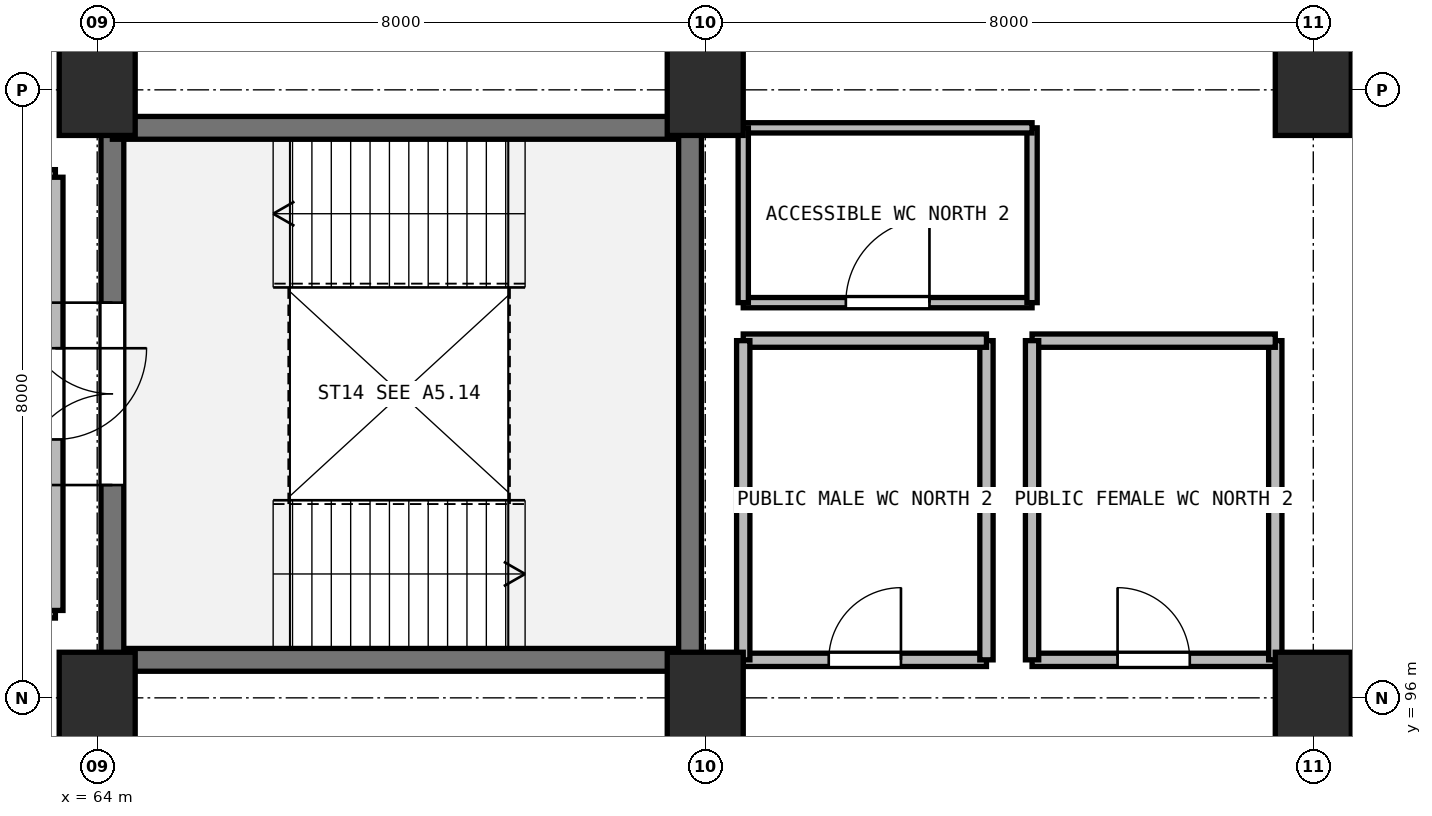
"""IFC4 building model, lengths in metres.
Left out: names, types, materials, properties, quantities, classifications, styles, units other than length and angle.
Written with IfcOpenShell. Run it as: python <this file> out.ifc"""

import sys

from ifc_helpers import new_model, si_unit, direction, frame, frame_2d, origin, origin_2d, place, context, subcontext, project, spatial, rectangle, extrude, element, fill, save


model = new_model("IFC4")
c1 = context("Model", 3, precision=1e-05, world=origin(), true_north=direction((0.0, 1.0)))
c2 = subcontext(c1, "Body", "Model", "MODEL_VIEW")
j1 = project(units=[si_unit("LENGTHUNIT", "METRE"), si_unit("PLANEANGLEUNIT", "RADIAN")], contexts=[c1])
p1 = place(None, origin())
s1 = spatial("IfcSite", under=j1, at=p1, CompositionType="ELEMENT")
p2 = place(p1, origin())
s2 = spatial("IfcBuilding", under=s1, at=p2, CompositionType="ELEMENT")
p3 = place(p2, frame((0.0, 0.0, 10.2)))
s3 = spatial("IfcBuildingStorey", under=s2, at=p3, CompositionType="ELEMENT", Elevation=10.2)
for number, where, z_axis, x_axis in (
    (1, (64.0, 96.0, 0.0), (0.0, 0.0, 1.0), (1.0, 0.0, 0.0)),
    (2, (64.0, 104.0, 0.0), (0.0, 0.0, 1.0), (1.0, 0.0, 0.0)),
    (3, (72.0, 96.0, 0.0), (0.0, 0.0, 1.0), (1.0, 0.0, 0.0)),
    (4, (72.0, 104.0, 0.0), (0.0, 0.0, 1.0), (1.0, 0.0, 0.0)),
    (5, (80.0, 96.0, 0.0), (0.0, 0.0, 1.0), (1.0, 0.0, 0.0)),
    (6, (80.0, 104.0, 0.0), (0.0, 0.0, 1.0), (1.0, 0.0, 0.0)),
):
    element("IfcColumn", number, at=place(p3, frame(where, z_axis=z_axis, x_axis=x_axis)), inside=s3, PredefinedType="COLUMN", context=c2, shape_type="SweptSolid", body=[
        extrude(rectangle(XDim=1.0, YDim=1.2, at=origin_2d()), origin(), (0.0, 0.0, 1.0), 4.8),
    ])
p4 = place(p3, frame((71.8, 96.5, 0.0), z_axis=(0.0, 0.0, 1.0), x_axis=(-1.0, 0.0, 0.0)))
e7 = element("IfcWall", 7, at=p4, inside=s3, PredefinedType="SHEAR", context=c2, shape_type="SweptSolid", body=[
    extrude(rectangle(XDim=7.6, YDim=0.3, at=frame_2d((3.8, 0.0))), origin(), (0.0, 0.0, 1.0), 4.46),
])
p5 = place(p3, frame((64.2, 96.5, 0.0), z_axis=(0.0, 0.0, 1.0), x_axis=(0.0, 1.0, 0.0)))
e8 = element("IfcWall", 8, at=p5, inside=s3, PredefinedType="SHEAR", context=c2, shape_type="SweptSolid", body=[
    extrude(rectangle(XDim=7.0, YDim=0.3, at=frame_2d((3.5, 0.0))), origin(), (0.0, 0.0, 1.0), 4.46),
])
p6 = place(p5, frame((2.3, 0.0, 0.0)))
e9 = element("IfcOpeningElement", 9, at=p6, cuts=e8, PredefinedType="OPENING", context=c2, shape_type="SweptSolid", body=[
    extrude(rectangle(XDim=2.4, YDim=2.2, at=frame_2d((1.2, 1.1))), frame((0.0, 0.16, 0.0), z_axis=(0.0, -1.0, 0.0), x_axis=(1.0, 0.0, 0.0)), (0.0, 0.0, 1.0), 0.32),
])
p7 = place(p3, frame((64.2, 103.5, 0.0), z_axis=(0.0, 0.0, 1.0), x_axis=(1.0, 0.0, 0.0)))
e10 = element("IfcWall", 10, at=p7, inside=s3, PredefinedType="SHEAR", context=c2, shape_type="SweptSolid", body=[
    extrude(rectangle(XDim=7.6, YDim=0.3, at=frame_2d((3.8, 0.0))), origin(), (0.0, 0.0, 1.0), 4.46),
])
p8 = place(p3, frame((71.8, 103.5, 0.0), z_axis=(0.0, 0.0, 1.0), x_axis=(0.0, -1.0, 0.0)))
e11 = element("IfcWall", 11, at=p8, inside=s3, PredefinedType="SHEAR", context=c2, shape_type="SweptSolid", body=[
    extrude(rectangle(XDim=7.0, YDim=0.3, at=frame_2d((3.5, 0.0))), origin(), (0.0, 0.0, 1.0), 4.46),
])
for number, where, z_axis, x_axis in (
    (12, (59.35, 102.85, 0.0), (0.0, 0.0, 1.0), (1.0, 0.0, 0.0)),
    (13, (63.45, 97.15, 0.0), (0.0, 0.0, 1.0), (-1.0, 0.0, 0.0)),
):
    element("IfcWall", number, at=place(p3, frame(where, z_axis=z_axis, x_axis=x_axis)), inside=s3, PredefinedType="PARTITIONING", context=c2, shape_type="SweptSolid", body=[
        extrude(rectangle(XDim=4.1, YDim=0.2, at=frame_2d((2.05, 0.0))), origin(), (0.0, 0.0, 1.0), 4.46),
    ])
p9 = place(p3, frame((63.45, 102.85, 0.0), z_axis=(0.0, 0.0, 1.0), x_axis=(0.0, -1.0, 0.0)))
e14 = element("IfcWall", 14, at=p9, inside=s3, PredefinedType="PARTITIONING", context=c2, shape_type="SweptSolid", body=[
    extrude(rectangle(XDim=5.7, YDim=0.2, at=frame_2d((2.85, 0.0))), origin(), (0.0, 0.0, 1.0), 3.6),
])
p10 = place(p9, frame((2.25, 0.0, 0.0)))
e15 = element("IfcOpeningElement", 15, at=p10, cuts=e14, PredefinedType="OPENING", context=c2, shape_type="SweptSolid", body=[
    extrude(rectangle(XDim=1.2, YDim=2.2, at=frame_2d((0.6, 1.1))), frame((0.0, 0.11, 0.0), z_axis=(0.0, -1.0, 0.0), x_axis=(1.0, 0.0, 0.0)), (0.0, 0.0, 1.0), 0.22),
])
p11 = place(p3, frame((72.5, 96.5, 0.0), z_axis=(0.0, 0.0, 1.0), x_axis=(1.0, 0.0, 0.0)))
e16 = element("IfcWall", 16, at=p11, inside=s3, PredefinedType="PARTITIONING", context=c2, shape_type="SweptSolid", body=[
    extrude(rectangle(XDim=3.2, YDim=0.175, at=frame_2d((1.6, 0.0))), origin(), (0.0, 0.0, 1.0), 3.6),
])
p12 = place(p11, frame((1.125, 0.0, 0.0)))
e17 = element("IfcOpeningElement", 17, at=p12, cuts=e16, PredefinedType="OPENING", context=c2, shape_type="SweptSolid", body=[
    extrude(rectangle(XDim=0.95, YDim=2.15, at=frame_2d((0.475, 1.075))), frame((0.0, 0.098, 0.0), z_axis=(0.0, -1.0, 0.0), x_axis=(1.0, 0.0, 0.0)), (0.0, 0.0, 1.0), 0.195),
])
p13 = place(p3, frame((75.7, 96.5, 0.0), z_axis=(0.0, 0.0, 1.0), x_axis=(0.0, 1.0, 0.0)))
e18 = element("IfcWall", 18, at=p13, inside=s3, PredefinedType="PARTITIONING", context=c2, shape_type="SweptSolid", body=[
    extrude(rectangle(XDim=4.2, YDim=0.175, at=frame_2d((2.1, 0.0))), origin(), (0.0, 0.0, 1.0), 4.46),
])
p14 = place(p3, frame((75.7, 100.7, 0.0), z_axis=(0.0, 0.0, 1.0), x_axis=(-1.0, 0.0, 0.0)))
e19 = element("IfcWall", 19, at=p14, inside=s3, PredefinedType="PARTITIONING", context=c2, shape_type="SweptSolid", body=[
    extrude(rectangle(XDim=3.2, YDim=0.175, at=frame_2d((1.6, 0.0))), origin(), (0.0, 0.0, 1.0), 4.46),
])
p15 = place(p3, frame((72.5, 100.7, 0.0), z_axis=(0.0, 0.0, 1.0), x_axis=(0.0, -1.0, 0.0)))
e20 = element("IfcWall", 20, at=p15, inside=s3, PredefinedType="PARTITIONING", context=c2, shape_type="SweptSolid", body=[
    extrude(rectangle(XDim=4.2, YDim=0.175, at=frame_2d((2.1, 0.0))), origin(), (0.0, 0.0, 1.0), 3.6),
])
p16 = place(p3, frame((76.3, 96.5, 0.0), z_axis=(0.0, 0.0, 1.0), x_axis=(1.0, 0.0, 0.0)))
e21 = element("IfcWall", 21, at=p16, inside=s3, PredefinedType="PARTITIONING", context=c2, shape_type="SweptSolid", body=[
    extrude(rectangle(XDim=3.2, YDim=0.175, at=frame_2d((1.6, 0.0))), origin(), (0.0, 0.0, 1.0), 3.6),
])
p17 = place(p16, frame((1.125, 0.0, 0.0)))
e22 = element("IfcOpeningElement", 22, at=p17, cuts=e21, PredefinedType="OPENING", context=c2, shape_type="SweptSolid", body=[
    extrude(rectangle(XDim=0.95, YDim=2.15, at=frame_2d((0.475, 1.075))), frame((0.0, 0.098, 0.0), z_axis=(0.0, -1.0, 0.0), x_axis=(1.0, 0.0, 0.0)), (0.0, 0.0, 1.0), 0.195),
])
p18 = place(p3, frame((79.5, 96.5, 0.0), z_axis=(0.0, 0.0, 1.0), x_axis=(0.0, 1.0, 0.0)))
e23 = element("IfcWall", 23, at=p18, inside=s3, PredefinedType="PARTITIONING", context=c2, shape_type="SweptSolid", body=[
    extrude(rectangle(XDim=4.2, YDim=0.175, at=frame_2d((2.1, 0.0))), origin(), (0.0, 0.0, 1.0), 3.6),
])
p19 = place(p3, frame((79.5, 100.7, 0.0), z_axis=(0.0, 0.0, 1.0), x_axis=(-1.0, 0.0, 0.0)))
e24 = element("IfcWall", 24, at=p19, inside=s3, PredefinedType="PARTITIONING", context=c2, shape_type="SweptSolid", body=[
    extrude(rectangle(XDim=3.2, YDim=0.175, at=frame_2d((1.6, 0.0))), origin(), (0.0, 0.0, 1.0), 4.46),
])
p20 = place(p3, frame((76.3, 100.7, 0.0), z_axis=(0.0, 0.0, 1.0), x_axis=(0.0, -1.0, 0.0)))
e25 = element("IfcWall", 25, at=p20, inside=s3, PredefinedType="PARTITIONING", context=c2, shape_type="SweptSolid", body=[
    extrude(rectangle(XDim=4.2, YDim=0.175, at=frame_2d((2.1, 0.0))), origin(), (0.0, 0.0, 1.0), 4.46),
])
p21 = place(p3, frame((72.5, 101.2, 0.0), z_axis=(0.0, 0.0, 1.0), x_axis=(1.0, 0.0, 0.0)))
e26 = element("IfcWall", 26, at=p21, inside=s3, PredefinedType="PARTITIONING", context=c2, shape_type="SweptSolid", body=[
    extrude(rectangle(XDim=3.8, YDim=0.135, at=frame_2d((1.9, 0.0))), origin(), (0.0, 0.0, 1.0), 4.46),
])
p22 = place(p21, frame((1.35, 0.0, 0.0)))
e27 = element("IfcOpeningElement", 27, at=p22, cuts=e26, PredefinedType="OPENING", context=c2, shape_type="SweptSolid", body=[
    extrude(rectangle(XDim=1.1, YDim=2.15, at=frame_2d((0.55, 1.075))), frame((0.0, 0.078, 0.0), z_axis=(0.0, -1.0, 0.0), x_axis=(1.0, 0.0, 0.0)), (0.0, 0.0, 1.0), 0.155),
])
p23 = place(p3, frame((76.3, 101.2, 0.0), z_axis=(0.0, 0.0, 1.0), x_axis=(0.0, 1.0, 0.0)))
e28 = element("IfcWall", 28, at=p23, inside=s3, PredefinedType="PARTITIONING", context=c2, shape_type="SweptSolid", body=[
    extrude(rectangle(XDim=2.3, YDim=0.135, at=frame_2d((1.15, 0.0))), origin(), (0.0, 0.0, 1.0), 4.46),
])
p24 = place(p3, frame((76.3, 103.5, 0.0), z_axis=(0.0, 0.0, 1.0), x_axis=(-1.0, 0.0, 0.0)))
e29 = element("IfcWall", 29, at=p24, inside=s3, PredefinedType="PARTITIONING", context=c2, shape_type="SweptSolid", body=[
    extrude(rectangle(XDim=3.8, YDim=0.135, at=frame_2d((1.9, 0.0))), origin(), (0.0, 0.0, 1.0), 3.6),
])
p25 = place(p3, frame((72.5, 103.5, 0.0), z_axis=(0.0, 0.0, 1.0), x_axis=(0.0, -1.0, 0.0)))
e30 = element("IfcWall", 30, at=p25, inside=s3, PredefinedType="PARTITIONING", context=c2, shape_type="SweptSolid", body=[
    extrude(rectangle(XDim=2.3, YDim=0.135, at=frame_2d((1.15, 0.0))), origin(), (0.0, 0.0, 1.0), 3.6),
])
p26 = place(p6, frame((2.4, 0.0, 0.0), z_axis=(0.0, 0.0, 1.0), x_axis=(-1.0, 0.0, 0.0)))
e31 = element("IfcDoor", 31, at=p26, inside=s3, OperationType="DOUBLE_DOOR_SINGLE_SWING", PredefinedType="DOOR", context=c2, shape_type="SweptSolid", body=[
    extrude(rectangle(XDim=2.4, YDim=2.2, at=frame_2d((1.2, 1.1))), frame((0.0, 0.025, 0.0), z_axis=(0.0, -1.0, 0.0), x_axis=(1.0, 0.0, 0.0)), (0.0, 0.0, 1.0), 0.05),
])
fill(e9, e31)
p27 = place(p10, origin())
e32 = element("IfcDoor", 32, at=p27, inside=s3, OperationType="SINGLE_SWING_LEFT", PredefinedType="DOOR", context=c2, shape_type="SweptSolid", body=[
    extrude(rectangle(XDim=1.2, YDim=2.2, at=frame_2d((0.6, 1.1))), frame((0.0, 0.025, 0.0), z_axis=(0.0, -1.0, 0.0), x_axis=(1.0, 0.0, 0.0)), (0.0, 0.0, 1.0), 0.05),
])
fill(e15, e32)
p28 = place(p12, origin())
e33 = element("IfcDoor", 33, at=p28, inside=s3, OperationType="SINGLE_SWING_RIGHT", PredefinedType="DOOR", context=c2, shape_type="SweptSolid", body=[
    extrude(rectangle(XDim=0.95, YDim=2.15, at=frame_2d((0.475, 1.075))), frame((0.0, 0.025, 0.0), z_axis=(0.0, -1.0, 0.0), x_axis=(1.0, 0.0, 0.0)), (0.0, 0.0, 1.0), 0.05),
])
fill(e17, e33)
p29 = place(p17, origin())
e34 = element("IfcDoor", 34, at=p29, inside=s3, OperationType="SINGLE_SWING_LEFT", PredefinedType="DOOR", context=c2, shape_type="SweptSolid", body=[
    extrude(rectangle(XDim=0.95, YDim=2.15, at=frame_2d((0.475, 1.075))), frame((0.0, 0.025, 0.0), z_axis=(0.0, -1.0, 0.0), x_axis=(1.0, 0.0, 0.0)), (0.0, 0.0, 1.0), 0.05),
])
fill(e22, e34)
p30 = place(p22, origin())
e35 = element("IfcDoor", 35, at=p30, inside=s3, OperationType="SINGLE_SWING_RIGHT", PredefinedType="DOOR", context=c2, shape_type="SweptSolid", body=[
    extrude(rectangle(XDim=1.1, YDim=2.15, at=frame_2d((0.55, 1.075))), frame((0.0, 0.025, 0.0), z_axis=(0.0, -1.0, 0.0), x_axis=(1.0, 0.0, 0.0)), (0.0, 0.0, 1.0), 0.05),
])
fill(e27, e35)
save(model, sys.argv[1])
